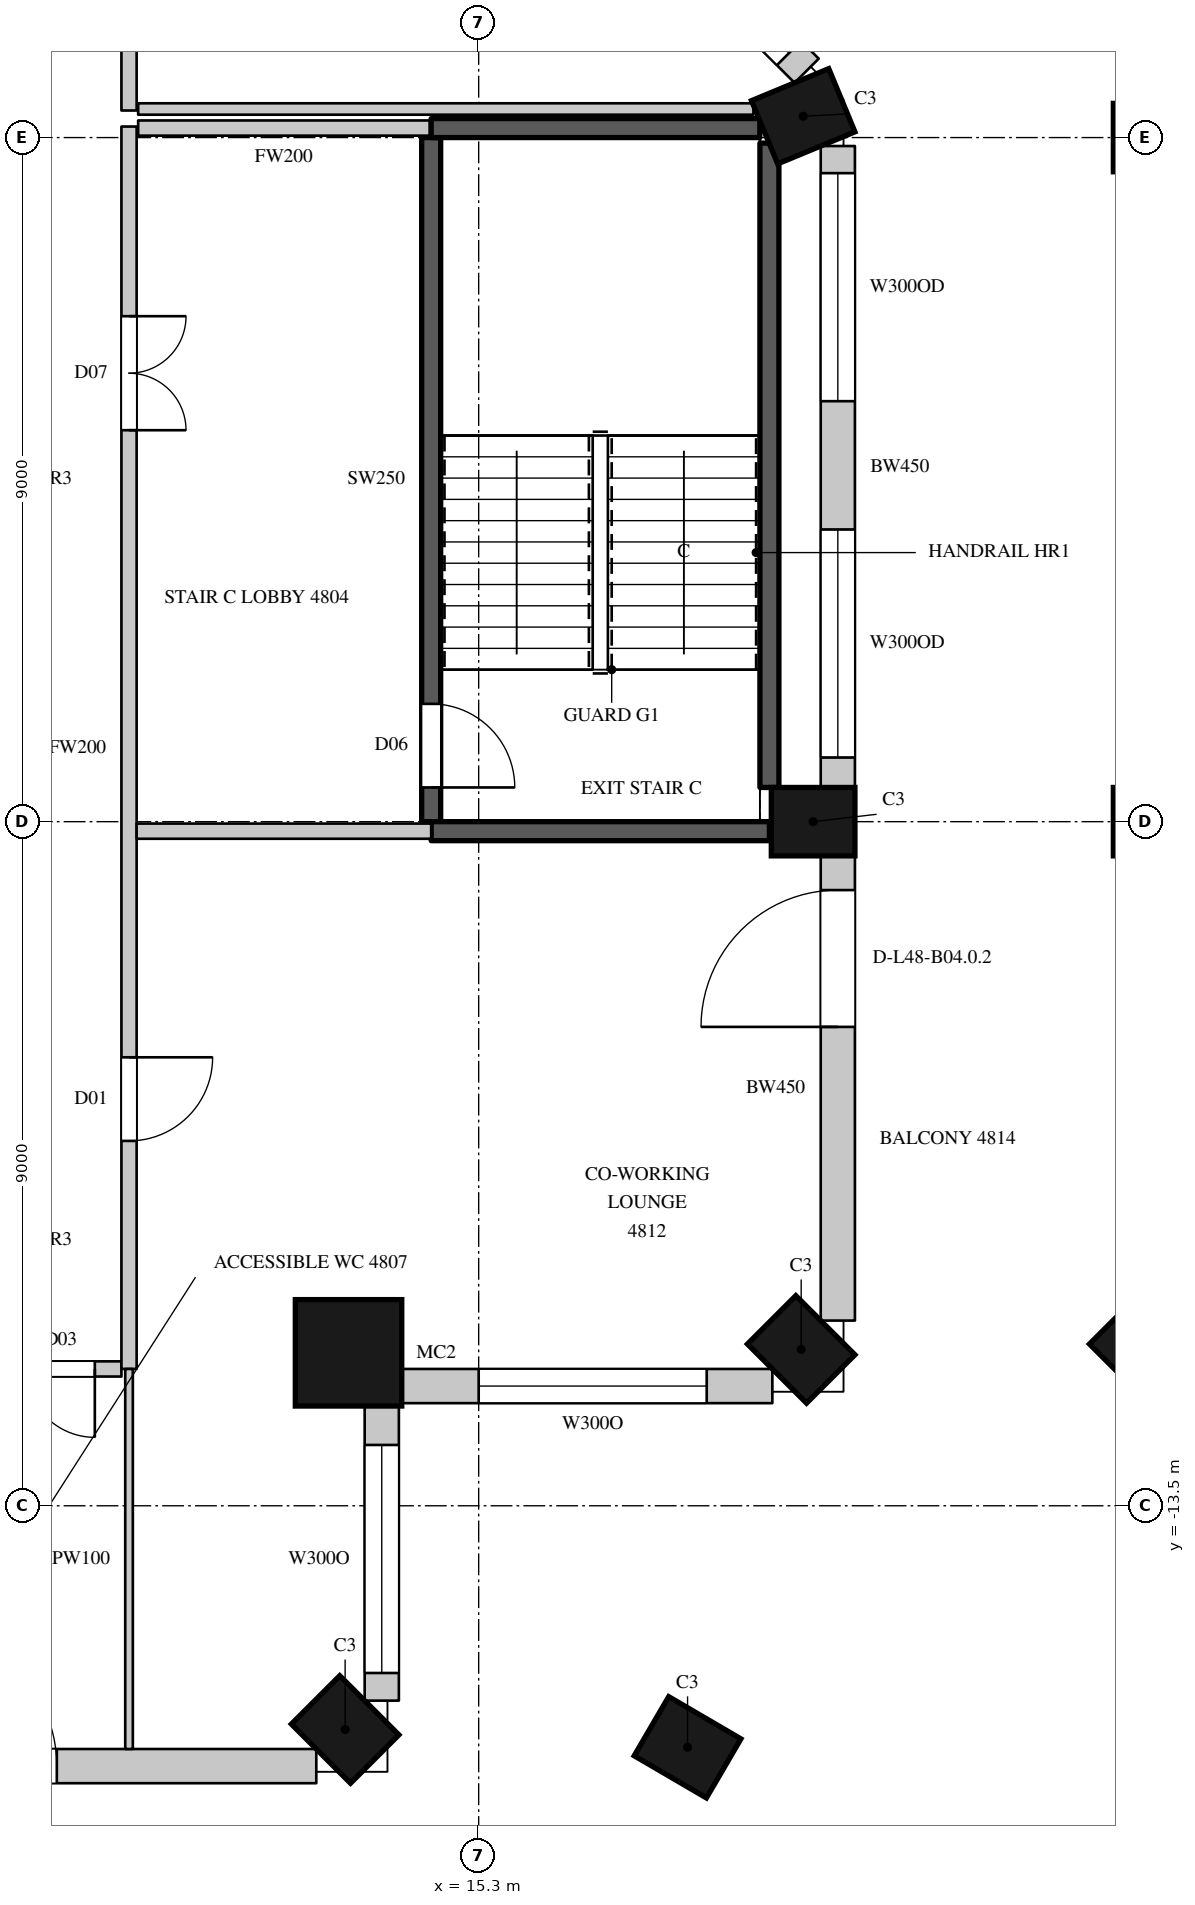
"""IFC4 building model, lengths in metres.
Left out: names, types, materials, properties, quantities, classifications, styles, units other than length and angle.
Written with IfcOpenShell. Run it as: python <this file> out.ifc"""

import sys

from ifc_helpers import new_model, si_unit, direction, frame, frame_2d, origin, origin_2d, place, context, subcontext, project, spatial, rectangle, circle, extrude, element, fill, save


model = new_model("IFC4")
c1 = context("Model", 3, precision=1e-05, world=origin(), true_north=direction((0.0, 1.0)))
c2 = subcontext(c1, "Body", "Model", "MODEL_VIEW")
j1 = project(units=[si_unit("LENGTHUNIT", "METRE"), si_unit("PLANEANGLEUNIT", "RADIAN")], contexts=[c1])
p1 = place(None, origin())
s1 = spatial("IfcSite", under=j1, at=p1, CompositionType="ELEMENT")
p2 = place(p1, origin())
s2 = spatial("IfcBuilding", under=s1, at=p2, CompositionType="ELEMENT")
p3 = place(p2, frame((0.0, 0.0, 217.9)))
s3 = spatial("IfcBuildingStorey", under=s2, at=p3, CompositionType="ELEMENT", Elevation=217.9)
p4 = place(p3, frame((13.543, -16.443, 0.0), z_axis=(0.0, 0.0, 1.0), x_axis=(0.707106781187, 0.707106781187, 0.0)))
e1 = element("IfcColumn", 1, at=p4, inside=s3, PredefinedType="COLUMN", context=c2, shape_type="SweptSolid", body=[
    extrude(rectangle(XDim=0.9, YDim=1.1, at=origin_2d()), origin(), (0.0, 0.0, 1.0), 4.1),
])
p5 = place(p3, frame((13.588, -11.488, 0.0), z_axis=(0.0, 0.0, 1.0), x_axis=(1.0, 0.0, 0.0)))
e2 = element("IfcColumn", 2, at=p5, inside=s3, PredefinedType="COLUMN", context=c2, shape_type="SweptSolid", body=[
    extrude(circle(Radius=0.7, at=origin_2d()), origin(), (0.0, 0.0, 1.0), 4.1),
])
for number, where, z_axis, x_axis in (
    (3, (19.543, -11.443, 0.0), (0.0, 0.0, 1.0), (0.707, 0.707, 0.0)),
    (4, (19.7, -4.5, 0.0), (0.0, 0.0, 1.0), (0.0, 1.0, 0.0)),
    (5, (19.57, 4.78, 0.0), (0.0, 0.0, 1.0), (-0.383, 0.924, 0.0)),
    (6, (18.048, -16.677, 0.0), (0.0, 0.0, 1.0), (0.504, 0.863, 0.0)),
    (7, (24.043, -11.443, 0.0), (0.0, 0.0, 1.0), (0.707, 0.707, 0.0)),
    (8, (24.2, -4.5, 0.0), (0.0, 0.0, 1.0), (0.0, 1.0, 0.0)),
    (9, (24.2, 4.5, 0.0), (0.0, 0.0, 1.0), (0.0, 1.0, 0.0)),
):
    element("IfcColumn", number, at=place(p3, frame(where, z_axis=z_axis, x_axis=x_axis)), inside=s3, PredefinedType="COLUMN", context=c2, shape_type="SweptSolid", body=[
        extrude(rectangle(XDim=0.9, YDim=1.1, at=origin_2d()), origin(), (0.0, 0.0, 1.0), 4.1),
    ])
p6 = place(p3, frame((6.75, -16.925, 0.0), z_axis=(0.0, 0.0, 1.0), x_axis=(1.0, 0.0, 0.0)))
e10 = element("IfcWall", 10, at=p6, inside=s3, PredefinedType="SOLIDWALL", context=c2, shape_type="SweptSolid", body=[
    extrude(rectangle(XDim=6.414, YDim=0.45, at=frame_2d((3.207, 0.0))), origin(), (0.0, 0.0, 1.0), 3.8),
])
p7 = place(p6, frame((1.2, 0.0, 0.0)))
e11 = element("IfcOpeningElement", 11, at=p7, cuts=e10, PredefinedType="OPENING", context=c2, shape_type="SweptSolid", body=[
    extrude(rectangle(XDim=1.8, YDim=2.4, at=frame_2d((0.9, 1.2))), frame((0.0, 0.235, 0.0), z_axis=(0.0, -1.0, 0.0), x_axis=(1.0, 0.0, 0.0)), (0.0, 0.0, 1.0), 0.47),
])
p8 = place(p3, frame((14.025, -16.064, 0.0), z_axis=(0.0, 0.0, 1.0), x_axis=(0.0, 1.0, 0.0)))
e12 = element("IfcWall", 12, at=p8, inside=s3, PredefinedType="SOLIDWALL", context=c2, shape_type="SweptSolid", body=[
    extrude(rectangle(XDim=3.909, YDim=0.45, at=frame_2d((1.955, 0.0))), origin(), (0.0, 0.0, 1.0), 3.8),
])
p9 = place(p8, frame((0.364, 0.0, 1.05)))
e13 = element("IfcOpeningElement", 13, at=p9, cuts=e12, PredefinedType="OPENING", context=c2, shape_type="SweptSolid", body=[
    extrude(rectangle(XDim=3.0, YDim=2.4, at=frame_2d((1.5, 1.2))), frame((0.0, 0.235, 0.0), z_axis=(0.0, -1.0, 0.0), x_axis=(1.0, 0.0, 0.0)), (0.0, 0.0, 1.0), 0.47),
])
p10 = place(p3, frame((14.255, -11.925, 0.0), z_axis=(0.0, 0.0, 1.0), x_axis=(1.0, 0.0, 0.0)))
e14 = element("IfcWall", 14, at=p10, inside=s3, PredefinedType="SOLIDWALL", context=c2, shape_type="SweptSolid", body=[
    extrude(rectangle(XDim=4.909, YDim=0.45, at=frame_2d((2.455, 0.0))), origin(), (0.0, 0.0, 1.0), 3.8),
])
p11 = place(p10, frame((1.045, 0.0, 1.05)))
e15 = element("IfcOpeningElement", 15, at=p11, cuts=e14, PredefinedType="OPENING", context=c2, shape_type="SweptSolid", body=[
    extrude(rectangle(XDim=3.0, YDim=2.4, at=frame_2d((1.5, 1.2))), frame((0.0, 0.235, 0.0), z_axis=(0.0, -1.0, 0.0), x_axis=(1.0, 0.0, 0.0)), (0.0, 0.0, 1.0), 0.47),
])
p12 = place(p3, frame((20.025, -11.064, 0.0), z_axis=(0.0, 0.0, 1.0), x_axis=(0.0, 1.0, 0.0)))
e16 = element("IfcWall", 16, at=p12, inside=s3, PredefinedType="SOLIDWALL", context=c2, shape_type="SweptSolid", body=[
    extrude(rectangle(XDim=6.114, YDim=0.45, at=frame_2d((3.057, 0.0))), origin(), (0.0, 0.0, 1.0), 3.8),
])
p13 = place(p12, frame((3.864, 0.0, 0.0)))
e17 = element("IfcOpeningElement", 17, at=p13, cuts=e16, PredefinedType="OPENING", context=c2, shape_type="SweptSolid", body=[
    extrude(rectangle(XDim=1.8, YDim=2.4, at=frame_2d((0.9, 1.2))), frame((0.0, 0.235, 0.0), z_axis=(0.0, -1.0, 0.0), x_axis=(1.0, 0.0, 0.0)), (0.0, 0.0, 1.0), 0.47),
])
p14 = place(p3, frame((20.025, -4.05, 0.0), z_axis=(0.0, 0.0, 1.0), x_axis=(0.0, 1.0, 0.0)))
e18 = element("IfcWall", 18, at=p14, inside=s3, PredefinedType="SOLIDWALL", context=c2, shape_type="SweptSolid", body=[
    extrude(rectangle(XDim=8.439, YDim=0.45, at=frame_2d((4.219, 0.0))), origin(), (0.0, 0.0, 1.0), 3.8),
])
p15 = place(p14, frame((0.394, 0.0, 1.05)))
e19 = element("IfcOpeningElement", 19, at=p15, cuts=e18, PredefinedType="OPENING", context=c2, shape_type="SweptSolid", body=[
    extrude(rectangle(XDim=3.0, YDim=2.4, at=frame_2d((1.5, 1.2))), frame((0.0, 0.235, 0.0), z_axis=(0.0, -1.0, 0.0), x_axis=(1.0, 0.0, 0.0)), (0.0, 0.0, 1.0), 0.47),
])
p16 = place(p14, frame((5.082, 0.0, 1.05)))
e20 = element("IfcOpeningElement", 20, at=p16, cuts=e18, PredefinedType="OPENING", context=c2, shape_type="SweptSolid", body=[
    extrude(rectangle(XDim=3.0, YDim=2.4, at=frame_2d((1.5, 1.2))), frame((0.0, 0.235, 0.0), z_axis=(0.0, -1.0, 0.0), x_axis=(1.0, 0.0, 0.0)), (0.0, 0.0, 1.0), 0.47),
])
p17 = place(p3, frame((19.615, 5.379, 0.0), z_axis=(0.0, 0.0, 1.0), x_axis=(-0.707089646058, 0.7071239159, 0.0)))
e21 = element("IfcWall", 21, at=p17, inside=s3, PredefinedType="SOLIDWALL", context=c2, shape_type="SweptSolid", body=[
    extrude(rectangle(XDim=7.124, YDim=0.45, at=frame_2d((3.562, 0.0))), origin(), (0.0, 0.0, 1.0), 3.8),
])
p18 = place(p17, frame((0.328, 0.0, 1.05)))
e22 = element("IfcOpeningElement", 22, at=p18, cuts=e21, PredefinedType="OPENING", context=c2, shape_type="SweptSolid", body=[
    extrude(rectangle(XDim=2.4, YDim=2.4, at=frame_2d((1.2, 1.2))), frame((0.0, 0.235, 0.0), z_axis=(0.0, -1.0, 0.0), x_axis=(1.0, 0.0, 0.0)), (0.0, 0.0, 1.0), 0.47),
])
p19 = place(p17, frame((4.359, 0.0, 1.05)))
e23 = element("IfcOpeningElement", 23, at=p19, cuts=e21, PredefinedType="OPENING", context=c2, shape_type="SweptSolid", body=[
    extrude(rectangle(XDim=2.4, YDim=2.4, at=frame_2d((1.2, 1.2))), frame((0.0, 0.235, 0.0), z_axis=(0.0, -1.0, 0.0), x_axis=(1.0, 0.0, 0.0)), (0.0, 0.0, 1.0), 0.47),
])
p20 = place(p3, frame((-10.9, -11.7, 0.0), z_axis=(0.0, 0.0, 1.0), x_axis=(1.0, 0.0, 0.0)))
e24 = element("IfcWall", 24, at=p20, inside=s3, PredefinedType="PARTITIONING", context=c2, shape_type="SweptSolid", body=[
    extrude(rectangle(XDim=21.5, YDim=0.2, at=frame_2d((10.75, 0.0))), origin(), (0.0, 0.0, 1.0), 3.8),
])
p21 = place(p20, frame((13.2, 0.0, 0.0)))
e25 = element("IfcOpeningElement", 25, at=p21, cuts=e24, PredefinedType="OPENING", context=c2, shape_type="SweptSolid", body=[
    extrude(rectangle(XDim=0.9, YDim=2.2, at=frame_2d((0.45, 1.1))), frame((0.0, 0.11, 0.0), z_axis=(0.0, -1.0, 0.0), x_axis=(1.0, 0.0, 0.0)), (0.0, 0.0, 1.0), 0.22),
])
p22 = place(p20, frame((16.5, 0.0, 0.0)))
e26 = element("IfcOpeningElement", 26, at=p22, cuts=e24, PredefinedType="OPENING", context=c2, shape_type="SweptSolid", body=[
    extrude(rectangle(XDim=0.9, YDim=2.2, at=frame_2d((0.45, 1.1))), frame((0.0, 0.11, 0.0), z_axis=(0.0, -1.0, 0.0), x_axis=(1.0, 0.0, 0.0)), (0.0, 0.0, 1.0), 0.22),
])
p23 = place(p20, frame((20.25, 0.0, 0.0)))
e27 = element("IfcOpeningElement", 27, at=p23, cuts=e24, PredefinedType="OPENING", context=c2, shape_type="SweptSolid", body=[
    extrude(rectangle(XDim=0.9, YDim=2.2, at=frame_2d((0.45, 1.1))), frame((0.0, 0.11, 0.0), z_axis=(0.0, -1.0, 0.0), x_axis=(1.0, 0.0, 0.0)), (0.0, 0.0, 1.0), 0.22),
])
p24 = place(p20, frame((1.25, 0.0, 0.0)))
e28 = element("IfcOpeningElement", 28, at=p24, cuts=e24, PredefinedType="OPENING", context=c2, shape_type="SweptSolid", body=[
    extrude(rectangle(XDim=1.1, YDim=2.4, at=frame_2d((0.55, 1.2))), frame((0.0, 0.11, 0.0), z_axis=(0.0, -1.0, 0.0), x_axis=(1.0, 0.0, 0.0)), (0.0, 0.0, 1.0), 0.22),
])
p25 = place(p20, frame((7.3, 0.0, 0.0)))
e29 = element("IfcOpeningElement", 29, at=p25, cuts=e24, PredefinedType="OPENING", context=c2, shape_type="SweptSolid", body=[
    extrude(rectangle(XDim=1.1, YDim=2.4, at=frame_2d((0.55, 1.2))), frame((0.0, 0.11, 0.0), z_axis=(0.0, -1.0, 0.0), x_axis=(1.0, 0.0, 0.0)), (0.0, 0.0, 1.0), 0.22),
])
p26 = place(p3, frame((10.7, -11.7, 0.0), z_axis=(0.0, 0.0, 1.0), x_axis=(0.0, 1.0, 0.0)))
e30 = element("IfcWall", 30, at=p26, inside=s3, PredefinedType="PARTITIONING", context=c2, shape_type="SweptSolid", body=[
    extrude(rectangle(XDim=16.345, YDim=0.2, at=frame_2d((8.172, 0.0))), origin(), (0.0, 0.0, 1.0), 3.8),
])
p27 = place(p26, frame((12.35, 0.0, 0.0)))
e31 = element("IfcOpeningElement", 31, at=p27, cuts=e30, PredefinedType="OPENING", context=c2, shape_type="SweptSolid", body=[
    extrude(rectangle(XDim=1.5, YDim=2.4, at=frame_2d((0.75, 1.2))), frame((0.0, 0.11, 0.0), z_axis=(0.0, -1.0, 0.0), x_axis=(1.0, 0.0, 0.0)), (0.0, 0.0, 1.0), 0.22),
])
p28 = place(p26, frame((3.0, 0.0, 0.0)))
e32 = element("IfcOpeningElement", 32, at=p28, cuts=e30, PredefinedType="OPENING", context=c2, shape_type="SweptSolid", body=[
    extrude(rectangle(XDim=1.1, YDim=2.4, at=frame_2d((0.55, 1.2))), frame((0.0, 0.11, 0.0), z_axis=(0.0, -1.0, 0.0), x_axis=(1.0, 0.0, 0.0)), (0.0, 0.0, 1.0), 0.22),
])
p29 = place(p3, frame((10.8, -4.625, 0.0), z_axis=(0.0, 0.0, 1.0), x_axis=(1.0, 0.0, 0.0)))
e33 = element("IfcWall", 33, at=p29, inside=s3, PredefinedType="PARTITIONING", context=c2, shape_type="SweptSolid", body=[
    extrude(rectangle(XDim=3.875, YDim=0.2, at=frame_2d((1.938, 0.0))), origin(), (0.0, 0.0, 1.0), 3.8),
])
p30 = place(p3, frame((10.7, 4.856, 0.0), z_axis=(0.0, 0.0, 1.0), x_axis=(0.0, 1.0, 0.0)))
e34 = element("IfcWall", 34, at=p30, inside=s3, PredefinedType="PARTITIONING", context=c2, shape_type="SweptSolid", body=[
    extrude(rectangle(XDim=7.244, YDim=0.2, at=frame_2d((3.622, 0.0))), origin(), (0.0, 0.0, 1.0), 3.8),
])
p31 = place(p30, frame((3.1, 0.0, 0.0)))
e35 = element("IfcOpeningElement", 35, at=p31, cuts=e34, PredefinedType="OPENING", context=c2, shape_type="SweptSolid", body=[
    extrude(rectangle(XDim=1.1, YDim=2.4, at=frame_2d((0.55, 1.2))), frame((0.0, 0.11, 0.0), z_axis=(0.0, -1.0, 0.0), x_axis=(1.0, 0.0, 0.0)), (0.0, 0.0, 1.0), 0.22),
])
p32 = place(p3, frame((10.82, 4.625, 0.0), z_axis=(0.0, 0.0, 1.0), x_axis=(1.0, 0.0, 0.0)))
e36 = element("IfcWall", 36, at=p32, inside=s3, PredefinedType="PARTITIONING", context=c2, shape_type="SweptSolid", body=[
    extrude(rectangle(XDim=3.835, YDim=0.2, at=frame_2d((1.917, 0.0))), origin(), (0.0, 0.0, 1.0), 3.8),
])
p33 = place(p3, frame((10.82, 4.876, 0.0), z_axis=(0.0, 0.0, 1.0), x_axis=(1.0, 0.0, 0.0)))
e37 = element("IfcWall", 37, at=p33, inside=s3, PredefinedType="PARTITIONING", context=c2, shape_type="SweptSolid", body=[
    extrude(rectangle(XDim=8.095, YDim=0.15, at=frame_2d((4.047, 0.0))), origin(), (0.0, 0.0, 1.0), 3.8),
])
p34 = place(p3, frame((14.675, -4.5, 0.0), z_axis=(0.0, 0.0, 1.0), x_axis=(0.0, 1.0, 0.0)))
e38 = element("IfcWall", 38, at=p34, inside=s3, PredefinedType="SHEAR", context=c2, shape_type="SweptSolid", body=[
    extrude(rectangle(XDim=9.0, YDim=0.25, at=frame_2d((4.5, 0.0))), origin(), (0.0, 0.0, 1.0), 3.8),
])
p35 = place(p34, frame((0.45, 0.0, 0.0)))
e39 = element("IfcOpeningElement", 39, at=p35, cuts=e38, PredefinedType="OPENING", context=c2, shape_type="SweptSolid", body=[
    extrude(rectangle(XDim=1.1, YDim=2.2, at=frame_2d((0.55, 1.1))), frame((0.0, 0.135, 0.0), z_axis=(0.0, -1.0, 0.0), x_axis=(1.0, 0.0, 0.0)), (0.0, 0.0, 1.0), 0.27),
])
p36 = place(p3, frame((14.675, -4.625, 0.0), z_axis=(0.0, 0.0, 1.0), x_axis=(1.0, 0.0, 0.0)))
e40 = element("IfcWall", 40, at=p36, inside=s3, PredefinedType="SHEAR", context=c2, shape_type="SweptSolid", body=[
    extrude(rectangle(XDim=4.45, YDim=0.25, at=frame_2d((2.225, 0.0))), origin(), (0.0, 0.0, 1.0), 3.8),
])
p37 = place(p3, frame((14.675, 4.625, 0.0), z_axis=(0.0, 0.0, 1.0), x_axis=(1.0, 0.0, 0.0)))
e41 = element("IfcWall", 41, at=p37, inside=s3, PredefinedType="SHEAR", context=c2, shape_type="SweptSolid", body=[
    extrude(rectangle(XDim=4.324, YDim=0.25, at=frame_2d((2.162, 0.0))), origin(), (0.0, 0.0, 1.0), 3.8),
])
p38 = place(p3, frame((19.125, -4.05, 0.0), z_axis=(0.0, 0.0, 1.0), x_axis=(0.0, 1.0, 0.0)))
e42 = element("IfcWall", 42, at=p38, inside=s3, PredefinedType="SHEAR", context=c2, shape_type="SweptSolid", body=[
    extrude(rectangle(XDim=8.477, YDim=0.25, at=frame_2d((4.238, 0.0))), origin(), (0.0, 0.0, 1.0), 3.8),
])
p39 = place(p3, frame((10.7, -16.7, 0.0), z_axis=(0.0, 0.0, 1.0), x_axis=(0.0, 1.0, 0.0)))
e43 = element("IfcWall", 43, at=p39, inside=s3, PredefinedType="PARTITIONING", context=c2, shape_type="SweptSolid", body=[
    extrude(rectangle(XDim=5.0, YDim=0.1, at=frame_2d((2.5, 0.0))), origin(), (0.0, 0.0, 1.0), 3.8),
])
p40 = place(p7, origin())
e44 = element("IfcDoor", 44, at=p40, inside=s3, OperationType="SLIDING_TO_LEFT", PredefinedType="DOOR", context=c2, shape_type="SweptSolid", body=[
    extrude(rectangle(XDim=1.8, YDim=2.4, at=frame_2d((0.9, 1.2))), frame((0.0, 0.13, 0.0), z_axis=(0.0, -1.0, 0.0), x_axis=(1.0, 0.0, 0.0)), (0.0, 0.0, 1.0), 0.05),
])
fill(e11, e44)
p41 = place(p9, origin())
e45 = element("IfcWindow", 45, at=p41, inside=s3, PartitioningType="SINGLE_PANEL", PredefinedType="WINDOW", context=c2, shape_type="SweptSolid", body=[
    extrude(rectangle(XDim=3.0, YDim=2.4, at=frame_2d((1.5, 1.2))), frame((0.0, 0.135, 0.0), z_axis=(0.0, -1.0, 0.0), x_axis=(1.0, 0.0, 0.0)), (0.0, 0.0, 1.0), 0.06),
])
fill(e13, e45)
p42 = place(p11, origin())
e46 = element("IfcWindow", 46, at=p42, inside=s3, PartitioningType="SINGLE_PANEL", PredefinedType="WINDOW", context=c2, shape_type="SweptSolid", body=[
    extrude(rectangle(XDim=3.0, YDim=2.4, at=frame_2d((1.5, 1.2))), frame((0.0, 0.135, 0.0), z_axis=(0.0, -1.0, 0.0), x_axis=(1.0, 0.0, 0.0)), (0.0, 0.0, 1.0), 0.06),
])
fill(e15, e46)
p43 = place(p13, origin())
e47 = element("IfcDoor", 47, at=p43, inside=s3, OperationType="SLIDING_TO_LEFT", PredefinedType="DOOR", context=c2, shape_type="SweptSolid", body=[
    extrude(rectangle(XDim=1.8, YDim=2.4, at=frame_2d((0.9, 1.2))), frame((0.0, 0.13, 0.0), z_axis=(0.0, -1.0, 0.0), x_axis=(1.0, 0.0, 0.0)), (0.0, 0.0, 1.0), 0.05),
])
fill(e17, e47)
p44 = place(p15, origin())
e48 = element("IfcWindow", 48, at=p44, inside=s3, PartitioningType="SINGLE_PANEL", PredefinedType="WINDOW", context=c2, shape_type="SweptSolid", body=[
    extrude(rectangle(XDim=3.0, YDim=2.4, at=frame_2d((1.5, 1.2))), frame((0.0, 0.135, 0.0), z_axis=(0.0, -1.0, 0.0), x_axis=(1.0, 0.0, 0.0)), (0.0, 0.0, 1.0), 0.06),
])
fill(e19, e48)
p45 = place(p16, origin())
e49 = element("IfcWindow", 49, at=p45, inside=s3, PartitioningType="SINGLE_PANEL", PredefinedType="WINDOW", context=c2, shape_type="SweptSolid", body=[
    extrude(rectangle(XDim=3.0, YDim=2.4, at=frame_2d((1.5, 1.2))), frame((0.0, 0.135, 0.0), z_axis=(0.0, -1.0, 0.0), x_axis=(1.0, 0.0, 0.0)), (0.0, 0.0, 1.0), 0.06),
])
fill(e20, e49)
p46 = place(p18, origin())
e50 = element("IfcWindow", 50, at=p46, inside=s3, PartitioningType="SINGLE_PANEL", PredefinedType="WINDOW", context=c2, shape_type="SweptSolid", body=[
    extrude(rectangle(XDim=2.4, YDim=2.4, at=frame_2d((1.2, 1.2))), frame((0.0, 0.135, 0.0), z_axis=(0.0, -1.0, 0.0), x_axis=(1.0, 0.0, 0.0)), (0.0, 0.0, 1.0), 0.06),
])
fill(e22, e50)
p47 = place(p27, origin())
e51 = element("IfcDoor", 51, at=p47, inside=s3, OperationType="DOUBLE_DOOR_SINGLE_SWING", PredefinedType="DOOR", context=c2, shape_type="SweptSolid", body=[
    extrude(rectangle(XDim=1.5, YDim=2.4, at=frame_2d((0.75, 1.2))), frame((0.0, 0.025, 0.0), z_axis=(0.0, -1.0, 0.0), x_axis=(1.0, 0.0, 0.0)), (0.0, 0.0, 1.0), 0.05),
])
fill(e31, e51)
p48 = place(p23, origin())
e52 = element("IfcDoor", 52, at=p48, inside=s3, OperationType="SINGLE_SWING_LEFT", PredefinedType="DOOR", context=c2, shape_type="SweptSolid", body=[
    extrude(rectangle(XDim=0.9, YDim=2.2, at=frame_2d((0.45, 1.1))), frame((0.0, 0.025, 0.0), z_axis=(0.0, -1.0, 0.0), x_axis=(1.0, 0.0, 0.0)), (0.0, 0.0, 1.0), 0.05),
])
fill(e27, e52)
p49 = place(p28, origin())
e53 = element("IfcDoor", 53, at=p49, inside=s3, OperationType="SINGLE_SWING_LEFT", PredefinedType="DOOR", context=c2, shape_type="SweptSolid", body=[
    extrude(rectangle(XDim=1.1, YDim=2.4, at=frame_2d((0.55, 1.2))), frame((0.0, 0.025, 0.0), z_axis=(0.0, -1.0, 0.0), x_axis=(1.0, 0.0, 0.0)), (0.0, 0.0, 1.0), 0.05),
])
fill(e32, e53)
p50 = place(p35, origin())
e54 = element("IfcDoor", 54, at=p50, inside=s3, OperationType="SINGLE_SWING_RIGHT", PredefinedType="DOOR", context=c2, shape_type="SweptSolid", body=[
    extrude(rectangle(XDim=1.1, YDim=2.2, at=frame_2d((0.55, 1.1))), frame((0.0, 0.025, 0.0), z_axis=(0.0, -1.0, 0.0), x_axis=(1.0, 0.0, 0.0)), (0.0, 0.0, 1.0), 0.05),
])
fill(e39, e54)
save(model, sys.argv[1])
